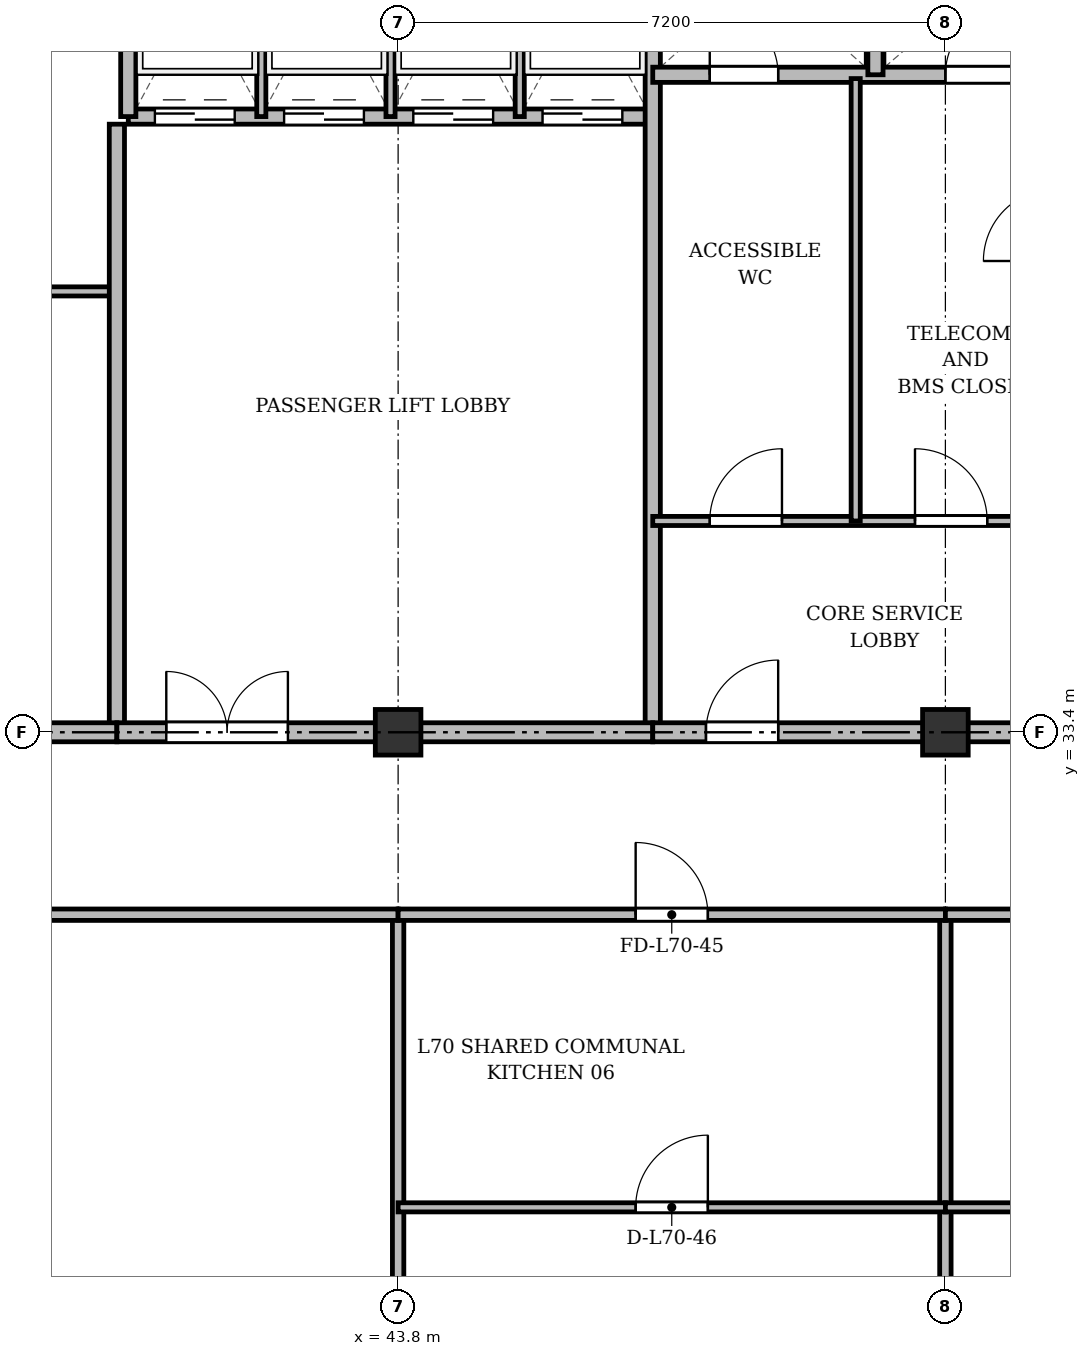
"""IFC4 building model, lengths in metres.
Left out: names, types, materials, properties, quantities, classifications, styles, units other than length and angle.
Written with IfcOpenShell. Run it as: python <this file> out.ifc"""

import sys

from ifc_helpers import new_model, si_unit, direction, frame, frame_2d, origin, origin_2d, place, context, subcontext, project, spatial, rectangle, extrude, source, transform, mapped, element, fill, save


model = new_model("IFC4")
c1 = context("Model", 3, precision=1e-05, world=origin(), true_north=direction((0.0, 1.0)))
c2 = subcontext(c1, "Body", "Model", "MODEL_VIEW")
j1 = project(units=[si_unit("LENGTHUNIT", "METRE"), si_unit("PLANEANGLEUNIT", "RADIAN")], contexts=[c1])
p1 = place(None, origin())
s1 = spatial("IfcSite", under=j1, at=p1, CompositionType="ELEMENT")
p2 = place(p1, origin())
s2 = spatial("IfcBuilding", under=s1, at=p2, CompositionType="ELEMENT")
p3 = place(p2, frame((0.0, 0.0, 270.3)))
s3 = spatial("IfcBuildingStorey", under=s2, at=p3, CompositionType="ELEMENT", Elevation=270.3)
m1 = source(origin(), c2, "Body", "SweptSolid", [
    extrude(rectangle(XDim=0.6, YDim=0.6, at=origin_2d()), origin(), (0.0, 0.0, 1.0), 3.6),
])
for number, where, z_axis, x_axis in (
    (1, (43.8, 33.4, 0.0), (0.0, 0.0, 1.0), (1.0, 0.0, 0.0)),
    (2, (51.0, 33.4, 0.0), (0.0, 0.0, 1.0), (1.0, 0.0, 0.0)),
):
    element("IfcColumn", number, at=place(p3, frame(where, z_axis=z_axis, x_axis=x_axis)), inside=s3, PredefinedType="COLUMN", context=c2, shape_type="MappedRepresentation", body=[
        mapped(m1, transform((0.0, 0.0, 0.0), x_axis=(1.0, 0.0, 0.0), y_axis=(0.0, 1.0, 0.0), z_axis=(0.0, 0.0, 1.0), scale=1.0)),
    ])
p4 = place(p3, frame((33.3, 39.2, 0.0), z_axis=(0.0, 0.0, 1.0), x_axis=(1.0, 0.0, 0.0)))
e3 = element("IfcWall", 3, at=p4, inside=s3, PredefinedType="PARTITIONING", context=c2, shape_type="SweptSolid", body=[
    extrude(rectangle(XDim=6.8, YDim=0.12, at=frame_2d((3.4, 0.0))), origin(), (0.0, 0.0, 1.0), 3.37),
])
p5 = place(p4, frame((2.6, 0.0, 0.0)))
e4 = element("IfcOpeningElement", 4, at=p5, cuts=e3, PredefinedType="OPENING", context=c2, shape_type="SweptSolid", body=[
    extrude(rectangle(XDim=0.95, YDim=2.15, at=frame_2d((0.475, 1.075))), frame((0.0, 0.07, 0.0), z_axis=(0.0, -1.0, 0.0), x_axis=(1.0, 0.0, 0.0)), (0.0, 0.0, 1.0), 0.14),
])
p6 = place(p3, frame((40.1, 33.4, 0.0), z_axis=(0.0, 0.0, 1.0), x_axis=(0.0, 1.0, 0.0)))
e5 = element("IfcWall", 5, at=p6, inside=s3, PredefinedType="SOLIDWALL", context=c2, shape_type="SweptSolid", body=[
    extrude(rectangle(XDim=8.0, YDim=0.2, at=frame_2d((4.0, 0.0))), origin(), (0.0, 0.0, 1.0), 2.92),
])
p7 = place(p3, frame((40.25, 41.5, 0.0), z_axis=(0.0, 0.0, 1.0), x_axis=(1.0, 0.0, 0.0)))
e6 = element("IfcWall", 6, at=p7, inside=s3, PredefinedType="SOLIDWALL", context=c2, shape_type="SweptSolid", body=[
    extrude(rectangle(XDim=6.9, YDim=0.2, at=frame_2d((3.45, 0.0))), origin(), (0.0, 0.0, 1.0), 3.37),
])
p8 = place(p7, frame((0.35, 0.0, 0.0)))
e7 = element("IfcOpeningElement", 7, at=p8, cuts=e6, PredefinedType="OPENING", context=c2, shape_type="SweptSolid", body=[
    extrude(rectangle(XDim=1.05, YDim=2.15, at=frame_2d((0.525, 1.075))), frame((0.0, 0.11, 0.0), z_axis=(0.0, -1.0, 0.0), x_axis=(1.0, 0.0, 0.0)), (0.0, 0.0, 1.0), 0.22),
])
p9 = place(p7, frame((2.05, 0.0, 0.0)))
e8 = element("IfcOpeningElement", 8, at=p9, cuts=e6, PredefinedType="OPENING", context=c2, shape_type="SweptSolid", body=[
    extrude(rectangle(XDim=1.05, YDim=2.15, at=frame_2d((0.525, 1.075))), frame((0.0, 0.11, 0.0), z_axis=(0.0, -1.0, 0.0), x_axis=(1.0, 0.0, 0.0)), (0.0, 0.0, 1.0), 0.22),
])
p10 = place(p7, frame((3.75, 0.0, 0.0)))
e9 = element("IfcOpeningElement", 9, at=p10, cuts=e6, PredefinedType="OPENING", context=c2, shape_type="SweptSolid", body=[
    extrude(rectangle(XDim=1.05, YDim=2.15, at=frame_2d((0.525, 1.075))), frame((0.0, 0.11, 0.0), z_axis=(0.0, -1.0, 0.0), x_axis=(1.0, 0.0, 0.0)), (0.0, 0.0, 1.0), 0.22),
])
p11 = place(p7, frame((5.45, 0.0, 0.0)))
e10 = element("IfcOpeningElement", 10, at=p11, cuts=e6, PredefinedType="OPENING", context=c2, shape_type="SweptSolid", body=[
    extrude(rectangle(XDim=1.05, YDim=2.15, at=frame_2d((0.525, 1.075))), frame((0.0, 0.11, 0.0), z_axis=(0.0, -1.0, 0.0), x_axis=(1.0, 0.0, 0.0)), (0.0, 0.0, 1.0), 0.22),
])
p12 = place(p3, frame((40.25, 41.5, 0.0), z_axis=(0.0, 0.0, 1.0), x_axis=(0.0, 1.0, 0.0)))
e11 = element("IfcWall", 11, at=p12, inside=s3, PredefinedType="SOLIDWALL", context=c2, shape_type="SweptSolid", body=[
    extrude(rectangle(XDim=3.2, YDim=0.2, at=frame_2d((1.6, 0.0))), origin(), (0.0, 0.0, 1.0), 3.37),
])
for number, where, z_axis, x_axis in (
    (12, (42.0, 41.5, 0.0), (0.0, 0.0, 1.0), (0.0, 1.0, 0.0)),
    (13, (43.7, 41.5, 0.0), (0.0, 0.0, 1.0), (0.0, 1.0, 0.0)),
    (14, (45.4, 41.5, 0.0), (0.0, 0.0, 1.0), (0.0, 1.0, 0.0)),
):
    element("IfcWall", number, at=place(p3, frame(where, z_axis=z_axis, x_axis=x_axis)), inside=s3, PredefinedType="PARTITIONING", context=c2, shape_type="SweptSolid", body=[
        extrude(rectangle(XDim=3.2, YDim=0.12, at=frame_2d((1.6, 0.0))), origin(), (0.0, 0.0, 1.0), 3.37),
    ])
p13 = place(p3, frame((47.15, 33.4, 0.0), z_axis=(0.0, 0.0, 1.0), x_axis=(0.0, 1.0, 0.0)))
e15 = element("IfcWall", 15, at=p13, inside=s3, PredefinedType="SOLIDWALL", context=c2, shape_type="SweptSolid", body=[
    extrude(rectangle(XDim=11.3, YDim=0.2, at=frame_2d((5.65, 0.0))), origin(), (0.0, 0.0, 1.0), 2.92),
])
p14 = place(p3, frame((33.3, 33.4, 0.0), z_axis=(0.0, 0.0, 1.0), x_axis=(1.0, 0.0, 0.0)))
e16 = element("IfcWall", 16, at=p14, inside=s3, PredefinedType="PARTITIONING", context=c2, shape_type="SweptSolid", body=[
    extrude(rectangle(XDim=6.8, YDim=0.25, at=frame_2d((3.4, 0.0))), origin(), (0.0, 0.0, 1.0), 2.92),
])
p15 = place(p14, frame((2.4, 0.0, 0.0)))
e17 = element("IfcOpeningElement", 17, at=p15, cuts=e16, PredefinedType="OPENING", context=c2, shape_type="SweptSolid", body=[
    extrude(rectangle(XDim=1.0, YDim=2.15, at=frame_2d((0.5, 1.075))), frame((0.0, 0.135, 0.0), z_axis=(0.0, -1.0, 0.0), x_axis=(1.0, 0.0, 0.0)), (0.0, 0.0, 1.0), 0.27),
])
p16 = place(p3, frame((40.1, 33.4, 0.0), z_axis=(0.0, 0.0, 1.0), x_axis=(1.0, 0.0, 0.0)))
e18 = element("IfcWall", 18, at=p16, inside=s3, PredefinedType="PARTITIONING", context=c2, shape_type="SweptSolid", body=[
    extrude(rectangle(XDim=7.05, YDim=0.25, at=frame_2d((3.525, 0.0))), origin(), (0.0, 0.0, 1.0), 2.92),
])
p17 = place(p16, frame((0.65, 0.0, 0.0)))
e19 = element("IfcOpeningElement", 19, at=p17, cuts=e18, PredefinedType="OPENING", context=c2, shape_type="SweptSolid", body=[
    extrude(rectangle(XDim=1.6, YDim=2.2, at=frame_2d((0.8, 1.1))), frame((0.0, 0.135, 0.0), z_axis=(0.0, -1.0, 0.0), x_axis=(1.0, 0.0, 0.0)), (0.0, 0.0, 1.0), 0.27),
])
p18 = place(p3, frame((47.15, 42.05, 0.0), z_axis=(0.0, 0.0, 1.0), x_axis=(1.0, 0.0, 0.0)))
e20 = element("IfcWall", 20, at=p18, inside=s3, PredefinedType="SOLIDWALL", context=c2, shape_type="SweptSolid", body=[
    extrude(rectangle(XDim=7.85, YDim=0.2, at=frame_2d((3.925, 0.0))), origin(), (0.0, 0.0, 1.0), 2.87),
])
p19 = place(p18, frame((0.75, 0.0, 0.0)))
e21 = element("IfcOpeningElement", 21, at=p19, cuts=e20, PredefinedType="OPENING", context=c2, shape_type="SweptSolid", body=[
    extrude(rectangle(XDim=0.9, YDim=2.1, at=frame_2d((0.45, 1.05))), frame((0.0, 0.11, 0.0), z_axis=(0.0, -1.0, 0.0), x_axis=(1.0, 0.0, 0.0)), (0.0, 0.0, 1.0), 0.22),
])
p20 = place(p18, frame((3.85, 0.0, 0.0)))
e22 = element("IfcOpeningElement", 22, at=p20, cuts=e20, PredefinedType="OPENING", context=c2, shape_type="SweptSolid", body=[
    extrude(rectangle(XDim=0.9, YDim=2.1, at=frame_2d((0.45, 1.05))), frame((0.0, 0.11, 0.0), z_axis=(0.0, -1.0, 0.0), x_axis=(1.0, 0.0, 0.0)), (0.0, 0.0, 1.0), 0.22),
])
p21 = place(p3, frame((50.08, 42.05, 0.0), z_axis=(0.0, 0.0, 1.0), x_axis=(0.0, 1.0, 0.0)))
e23 = element("IfcWall", 23, at=p21, inside=s3, PredefinedType="SOLIDWALL", context=c2, shape_type="SweptSolid", body=[
    extrude(rectangle(XDim=2.65, YDim=0.2, at=frame_2d((1.325, 0.0))), origin(), (0.0, 0.0, 1.0), 3.37),
])
p22 = place(p3, frame((47.15, 36.18, 0.0), z_axis=(0.0, 0.0, 1.0), x_axis=(1.0, 0.0, 0.0)))
e24 = element("IfcWall", 24, at=p22, inside=s3, PredefinedType="PARTITIONING", context=c2, shape_type="SweptSolid", body=[
    extrude(rectangle(XDim=5.3, YDim=0.12, at=frame_2d((2.65, 0.0))), origin(), (0.0, 0.0, 1.0), 2.87),
])
p23 = place(p22, frame((0.75, 0.0, 0.0)))
e25 = element("IfcOpeningElement", 25, at=p23, cuts=e24, PredefinedType="OPENING", context=c2, shape_type="SweptSolid", body=[
    extrude(rectangle(XDim=0.95, YDim=2.15, at=frame_2d((0.475, 1.075))), frame((0.0, 0.07, 0.0), z_axis=(0.0, -1.0, 0.0), x_axis=(1.0, 0.0, 0.0)), (0.0, 0.0, 1.0), 0.14),
])
p24 = place(p22, frame((3.45, 0.0, 0.0)))
e26 = element("IfcOpeningElement", 26, at=p24, cuts=e24, PredefinedType="OPENING", context=c2, shape_type="SweptSolid", body=[
    extrude(rectangle(XDim=0.95, YDim=2.15, at=frame_2d((0.475, 1.075))), frame((0.0, 0.07, 0.0), z_axis=(0.0, -1.0, 0.0), x_axis=(1.0, 0.0, 0.0)), (0.0, 0.0, 1.0), 0.14),
])
p25 = place(p3, frame((49.82, 36.18, 0.0), z_axis=(0.0, 0.0, 1.0), x_axis=(0.0, 1.0, 0.0)))
e27 = element("IfcWall", 27, at=p25, inside=s3, PredefinedType="PARTITIONING", context=c2, shape_type="SweptSolid", body=[
    extrude(rectangle(XDim=5.82, YDim=0.12, at=frame_2d((2.91, 0.0))), origin(), (0.0, 0.0, 1.0), 3.37),
])
p26 = place(p3, frame((47.15, 33.4, 0.0), z_axis=(0.0, 0.0, 1.0), x_axis=(1.0, 0.0, 0.0)))
e28 = element("IfcWall", 28, at=p26, inside=s3, PredefinedType="PARTITIONING", context=c2, shape_type="SweptSolid", body=[
    extrude(rectangle(XDim=11.15, YDim=0.25, at=frame_2d((5.575, 0.0))), origin(), (0.0, 0.0, 1.0), 2.92),
])
p27 = place(p26, frame((0.7, 0.0, 0.0)))
e29 = element("IfcOpeningElement", 29, at=p27, cuts=e28, PredefinedType="OPENING", context=c2, shape_type="SweptSolid", body=[
    extrude(rectangle(XDim=0.95, YDim=2.15, at=frame_2d((0.475, 1.075))), frame((0.0, 0.135, 0.0), z_axis=(0.0, -1.0, 0.0), x_axis=(1.0, 0.0, 0.0)), (0.0, 0.0, 1.0), 0.27),
])
p28 = place(p26, frame((6.0, 0.0, 0.0)))
e30 = element("IfcOpeningElement", 30, at=p28, cuts=e28, PredefinedType="OPENING", context=c2, shape_type="SweptSolid", body=[
    extrude(rectangle(XDim=1.2, YDim=2.15, at=frame_2d((0.6, 1.075))), frame((0.0, 0.135, 0.0), z_axis=(0.0, -1.0, 0.0), x_axis=(1.0, 0.0, 0.0)), (0.0, 0.0, 1.0), 0.27),
])
for number, where, z_axis, x_axis in (
    (31, (43.8, 3.725, 0.0), (0.0, 0.0, 1.0), (0.0, 1.0, 0.0)),
    (32, (51.0, 3.725, 0.0), (0.0, 0.0, 1.0), (0.0, 1.0, 0.0)),
):
    element("IfcWall", number, at=place(p3, frame(where, z_axis=z_axis, x_axis=x_axis)), inside=s3, PredefinedType="PARTITIONING", context=c2, shape_type="SweptSolid", body=[
        extrude(rectangle(XDim=27.275, YDim=0.15, at=frame_2d((13.637, 0.0))), origin(), (0.0, 0.0, 1.0), 2.87),
    ])
p29 = place(p3, frame((30.6, 31.0, 0.0), z_axis=(0.0, 0.0, 1.0), x_axis=(1.0, 0.0, 0.0)))
e33 = element("IfcWall", 33, at=p29, inside=s3, PredefinedType="PARTITIONING", context=c2, shape_type="SweptSolid", body=[
    extrude(rectangle(XDim=13.2, YDim=0.15, at=frame_2d((6.6, 0.0))), origin(), (0.0, 0.0, 1.0), 2.87),
])
p30 = place(p29, frame((5.8, 0.0, 0.0)))
e34 = element("IfcOpeningElement", 34, at=p30, cuts=e33, PredefinedType="OPENING", context=c2, shape_type="SweptSolid", body=[
    extrude(rectangle(XDim=1.6, YDim=2.2, at=frame_2d((0.8, 1.1))), frame((0.0, 0.085, 0.0), z_axis=(0.0, -1.0, 0.0), x_axis=(1.0, 0.0, 0.0)), (0.0, 0.0, 1.0), 0.17),
])
p31 = place(p3, frame((43.8, 31.0, 0.0), z_axis=(0.0, 0.0, 1.0), x_axis=(1.0, 0.0, 0.0)))
e35 = element("IfcWall", 35, at=p31, inside=s3, PredefinedType="PARTITIONING", context=c2, shape_type="SweptSolid", body=[
    extrude(rectangle(XDim=7.2, YDim=0.15, at=frame_2d((3.6, 0.0))), origin(), (0.0, 0.0, 1.0), 2.87),
])
p32 = place(p31, frame((3.125, 0.0, 0.0)))
e36 = element("IfcOpeningElement", 36, at=p32, cuts=e35, PredefinedType="OPENING", context=c2, shape_type="SweptSolid", body=[
    extrude(rectangle(XDim=0.95, YDim=2.15, at=frame_2d((0.475, 1.075))), frame((0.0, 0.085, 0.0), z_axis=(0.0, -1.0, 0.0), x_axis=(1.0, 0.0, 0.0)), (0.0, 0.0, 1.0), 0.17),
])
p33 = place(p3, frame((43.8, 27.15, 0.0), z_axis=(0.0, 0.0, 1.0), x_axis=(1.0, 0.0, 0.0)))
e37 = element("IfcWall", 37, at=p33, inside=s3, PredefinedType="PARTITIONING", context=c2, shape_type="SweptSolid", body=[
    extrude(rectangle(XDim=7.2, YDim=0.12, at=frame_2d((3.6, 0.0))), origin(), (0.0, 0.0, 1.0), 2.87),
])
p34 = place(p33, frame((3.125, 0.0, 0.0)))
e38 = element("IfcOpeningElement", 38, at=p34, cuts=e37, PredefinedType="OPENING", context=c2, shape_type="SweptSolid", body=[
    extrude(rectangle(XDim=0.95, YDim=2.15, at=frame_2d((0.475, 1.075))), frame((0.0, 0.07, 0.0), z_axis=(0.0, -1.0, 0.0), x_axis=(1.0, 0.0, 0.0)), (0.0, 0.0, 1.0), 0.14),
])
p35 = place(p3, frame((51.0, 31.0, 0.0), z_axis=(0.0, 0.0, 1.0), x_axis=(1.0, 0.0, 0.0)))
e39 = element("IfcWall", 39, at=p35, inside=s3, PredefinedType="PARTITIONING", context=c2, shape_type="SweptSolid", body=[
    extrude(rectangle(XDim=4.2, YDim=0.15, at=frame_2d((2.1, 0.0))), origin(), (0.0, 0.0, 1.0), 2.87),
])
p36 = place(p35, frame((1.529, 0.0, 0.0)))
e40 = element("IfcOpeningElement", 40, at=p36, cuts=e39, PredefinedType="OPENING", context=c2, shape_type="SweptSolid", body=[
    extrude(rectangle(XDim=0.95, YDim=2.15, at=frame_2d((0.475, 1.075))), frame((0.0, 0.085, 0.0), z_axis=(0.0, -1.0, 0.0), x_axis=(1.0, 0.0, 0.0)), (0.0, 0.0, 1.0), 0.17),
])
p37 = place(p3, frame((51.0, 27.15, 0.0), z_axis=(0.0, 0.0, 1.0), x_axis=(1.0, 0.0, 0.0)))
e41 = element("IfcWall", 41, at=p37, inside=s3, PredefinedType="PARTITIONING", context=c2, shape_type="SweptSolid", body=[
    extrude(rectangle(XDim=4.2, YDim=0.12, at=frame_2d((2.1, 0.0))), origin(), (0.0, 0.0, 1.0), 2.87),
])
p38 = place(p37, frame((1.529, 0.0, 0.0)))
e42 = element("IfcOpeningElement", 42, at=p38, cuts=e41, PredefinedType="OPENING", context=c2, shape_type="SweptSolid", body=[
    extrude(rectangle(XDim=0.95, YDim=2.15, at=frame_2d((0.475, 1.075))), frame((0.0, 0.07, 0.0), z_axis=(0.0, -1.0, 0.0), x_axis=(1.0, 0.0, 0.0)), (0.0, 0.0, 1.0), 0.14),
])
m2 = source(origin(), c2, "Body", "SweptSolid", [
    extrude(rectangle(XDim=1.05, YDim=2.15, at=frame_2d((0.525, 1.075))), frame((0.0, 0.025, 0.0), z_axis=(0.0, -1.0, 0.0), x_axis=(1.0, 0.0, 0.0)), (0.0, 0.0, 1.0), 0.05),
])
p39 = place(p8, origin())
e43 = element("IfcDoor", 43, at=p39, inside=s3, OperationType="DOUBLE_DOOR_SLIDING", PredefinedType="DOOR", context=c2, shape_type="MappedRepresentation", body=[
    mapped(m2, transform((0.0, 0.0, 0.0), x_axis=(1.0, 0.0, 0.0), y_axis=(0.0, 1.0, 0.0), z_axis=(0.0, 0.0, 1.0), scale=1.0)),
])
fill(e7, e43)
p40 = place(p9, origin())
e44 = element("IfcDoor", 44, at=p40, inside=s3, OperationType="DOUBLE_DOOR_SLIDING", PredefinedType="DOOR", context=c2, shape_type="MappedRepresentation", body=[
    mapped(m2, transform((0.0, 0.0, 0.0), x_axis=(1.0, 0.0, 0.0), y_axis=(0.0, 1.0, 0.0), z_axis=(0.0, 0.0, 1.0), scale=1.0)),
])
fill(e8, e44)
p41 = place(p10, origin())
e45 = element("IfcDoor", 45, at=p41, inside=s3, OperationType="DOUBLE_DOOR_SLIDING", PredefinedType="DOOR", context=c2, shape_type="MappedRepresentation", body=[
    mapped(m2, transform((0.0, 0.0, 0.0), x_axis=(1.0, 0.0, 0.0), y_axis=(0.0, 1.0, 0.0), z_axis=(0.0, 0.0, 1.0), scale=1.0)),
])
fill(e9, e45)
p42 = place(p11, origin())
e46 = element("IfcDoor", 46, at=p42, inside=s3, OperationType="DOUBLE_DOOR_SLIDING", PredefinedType="DOOR", context=c2, shape_type="MappedRepresentation", body=[
    mapped(m2, transform((0.0, 0.0, 0.0), x_axis=(1.0, 0.0, 0.0), y_axis=(0.0, 1.0, 0.0), z_axis=(0.0, 0.0, 1.0), scale=1.0)),
])
fill(e10, e46)
m3 = source(origin(), c2, "Body", "SweptSolid", [
    extrude(rectangle(XDim=1.6, YDim=2.2, at=frame_2d((0.8, 1.1))), frame((0.0, 0.025, 0.0), z_axis=(0.0, -1.0, 0.0), x_axis=(1.0, 0.0, 0.0)), (0.0, 0.0, 1.0), 0.05),
])
p43 = place(p17, origin())
e47 = element("IfcDoor", 47, at=p43, inside=s3, OperationType="DOUBLE_DOOR_SINGLE_SWING", PredefinedType="DOOR", context=c2, shape_type="MappedRepresentation", body=[
    mapped(m3, transform((0.0, 0.0, 0.0), x_axis=(1.0, 0.0, 0.0), y_axis=(0.0, 1.0, 0.0), z_axis=(0.0, 0.0, 1.0), scale=1.0)),
])
fill(e19, e47)
m4 = source(origin(), c2, "Body", "SweptSolid", [
    extrude(rectangle(XDim=0.9, YDim=2.1, at=frame_2d((0.45, 1.05))), frame((0.0, 0.025, 0.0), z_axis=(0.0, -1.0, 0.0), x_axis=(1.0, 0.0, 0.0)), (0.0, 0.0, 1.0), 0.05),
])
p44 = place(p19, origin())
e48 = element("IfcDoor", 48, at=p44, inside=s3, OperationType="SINGLE_SWING_LEFT", PredefinedType="DOOR", context=c2, shape_type="MappedRepresentation", body=[
    mapped(m4, transform((0.0, 0.0, 0.0), x_axis=(1.0, 0.0, 0.0), y_axis=(0.0, 1.0, 0.0), z_axis=(0.0, 0.0, 1.0), scale=1.0)),
])
fill(e21, e48)
p45 = place(p20, origin())
e49 = element("IfcDoor", 49, at=p45, inside=s3, OperationType="SINGLE_SWING_RIGHT", PredefinedType="DOOR", context=c2, shape_type="MappedRepresentation", body=[
    mapped(m4, transform((0.0, 0.0, 0.0), x_axis=(1.0, 0.0, 0.0), y_axis=(0.0, 1.0, 0.0), z_axis=(0.0, 0.0, 1.0), scale=1.0)),
])
fill(e22, e49)
m5 = source(origin(), c2, "Body", "SweptSolid", [
    extrude(rectangle(XDim=0.95, YDim=2.15, at=frame_2d((0.475, 1.075))), frame((0.0, 0.025, 0.0), z_axis=(0.0, -1.0, 0.0), x_axis=(1.0, 0.0, 0.0)), (0.0, 0.0, 1.0), 0.05),
])
p46 = place(p23, origin())
e50 = element("IfcDoor", 50, at=p46, inside=s3, OperationType="SINGLE_SWING_RIGHT", PredefinedType="DOOR", context=c2, shape_type="MappedRepresentation", body=[
    mapped(m5, transform((0.0, 0.0, 0.0), x_axis=(1.0, 0.0, 0.0), y_axis=(0.0, 1.0, 0.0), z_axis=(0.0, 0.0, 1.0), scale=1.0)),
])
fill(e25, e50)
p47 = place(p24, origin())
e51 = element("IfcDoor", 51, at=p47, inside=s3, OperationType="SINGLE_SWING_LEFT", PredefinedType="DOOR", context=c2, shape_type="MappedRepresentation", body=[
    mapped(m5, transform((0.0, 0.0, 0.0), x_axis=(1.0, 0.0, 0.0), y_axis=(0.0, 1.0, 0.0), z_axis=(0.0, 0.0, 1.0), scale=1.0)),
])
fill(e26, e51)
p48 = place(p27, origin())
e52 = element("IfcDoor", 52, at=p48, inside=s3, OperationType="SINGLE_SWING_RIGHT", PredefinedType="DOOR", context=c2, shape_type="MappedRepresentation", body=[
    mapped(m5, transform((0.0, 0.0, 0.0), x_axis=(1.0, 0.0, 0.0), y_axis=(0.0, 1.0, 0.0), z_axis=(0.0, 0.0, 1.0), scale=1.0)),
])
fill(e29, e52)
p49 = place(p32, origin())
e53 = element("IfcDoor", 53, at=p49, inside=s3, OperationType="SINGLE_SWING_LEFT", PredefinedType="DOOR", context=c2, shape_type="MappedRepresentation", body=[
    mapped(m5, transform((0.0, 0.0, 0.0), x_axis=(1.0, 0.0, 0.0), y_axis=(0.0, 1.0, 0.0), z_axis=(0.0, 0.0, 1.0), scale=1.0)),
])
fill(e36, e53)
p50 = place(p34, origin())
e54 = element("IfcDoor", 54, at=p50, inside=s3, OperationType="SINGLE_SWING_RIGHT", PredefinedType="DOOR", context=c2, shape_type="MappedRepresentation", body=[
    mapped(m5, transform((0.0, 0.0, 0.0), x_axis=(1.0, 0.0, 0.0), y_axis=(0.0, 1.0, 0.0), z_axis=(0.0, 0.0, 1.0), scale=1.0)),
])
fill(e38, e54)
save(model, sys.argv[1])
